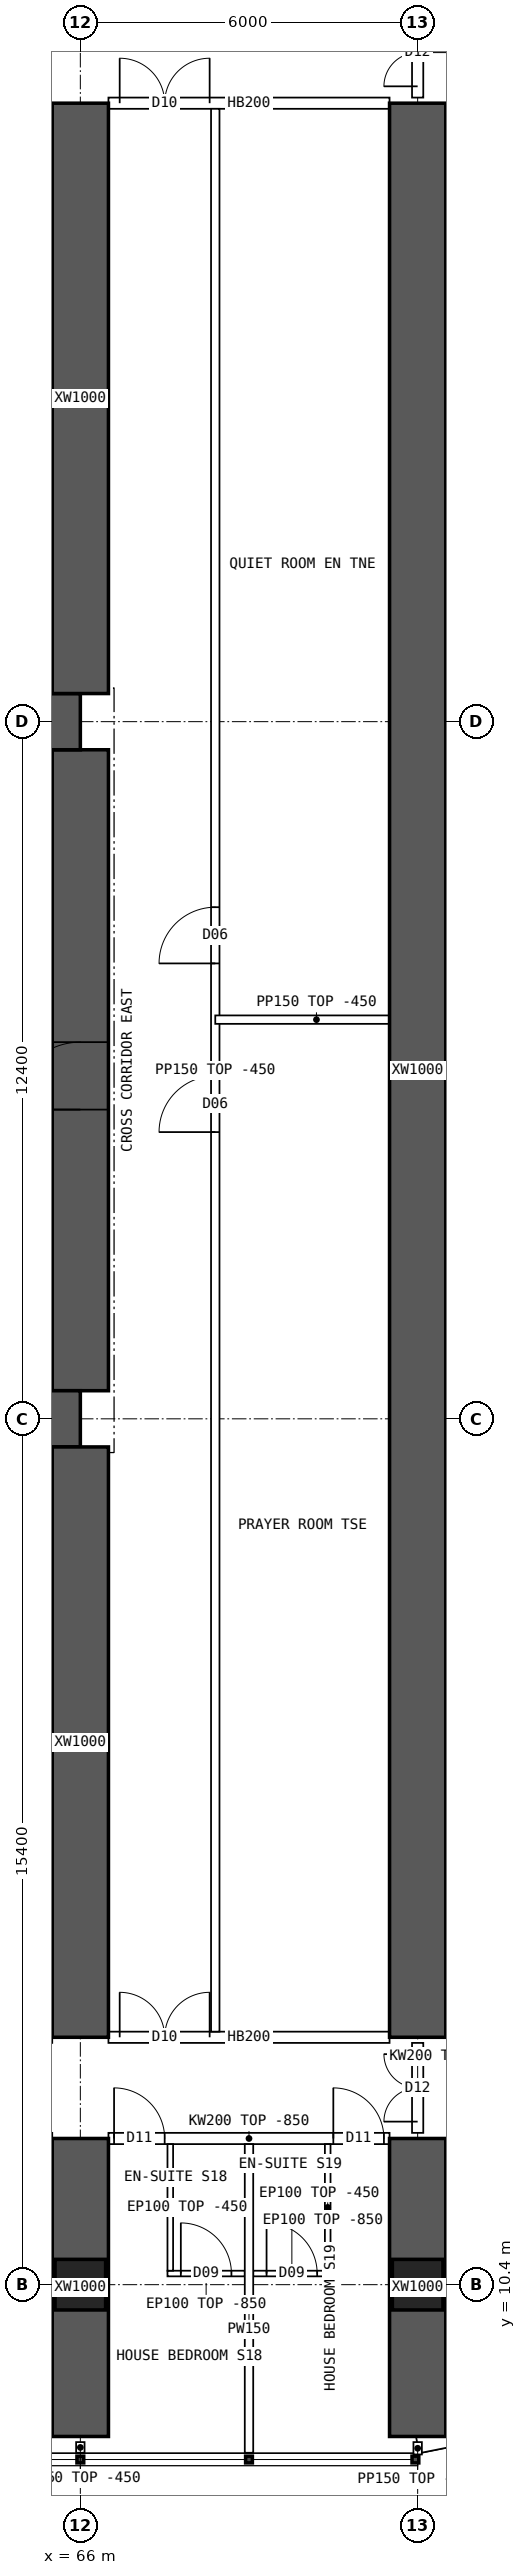
"""IFC4 building model, lengths in metres.
Left out: names, types, materials, properties, quantities, classifications, styles, units other than length and angle.
Written with IfcOpenShell. Run it as: python <this file> out.ifc"""

import sys

from ifc_helpers import new_model, si_unit, direction, frame, frame_2d, origin, origin_2d, place, context, subcontext, project, spatial, polyline, rectangle, hollow_rectangle, outline, extrude, element, fill, save


model = new_model("IFC4")
c1 = context("Model", 3, precision=1e-05, world=origin(), true_north=direction((0.0, 1.0)))
c2 = subcontext(c1, "Body", "Model", "MODEL_VIEW")
j1 = project(units=[si_unit("LENGTHUNIT", "METRE"), si_unit("PLANEANGLEUNIT", "RADIAN")], contexts=[c1])
p1 = place(None, origin())
s1 = spatial("IfcSite", under=j1, at=p1, CompositionType="ELEMENT")
p2 = place(p1, origin())
s2 = spatial("IfcBuilding", under=s1, at=p2, CompositionType="ELEMENT")
p3 = place(p2, frame((0.0, 0.0, 35.2)))
s3 = spatial("IfcBuildingStorey", under=s2, at=p3, CompositionType="ELEMENT", Elevation=35.2)
for number, where, z_axis, x_axis in (
    (1, (66.0, 10.4, 0.0), (0.0, 0.0, 1.0), (1.0, 0.0, 0.0)),
    (2, (72.0, 10.4, 0.0), (0.0, 0.0, 1.0), (1.0, 0.0, 0.0)),
):
    element("IfcColumn", number, at=place(p3, frame(where, z_axis=z_axis, x_axis=x_axis)), inside=s3, PredefinedType="COLUMN", context=c2, shape_type="SweptSolid", body=[
        extrude(hollow_rectangle(XDim=0.9, YDim=0.9, WallThickness=0.09, at=origin_2d()), origin(), (0.0, 0.0, 1.0), 3.75),
    ])
for number, where, z_axis, x_axis in (
    (3, (18.0, 25.8, 0.0), (0.0, 0.0, 1.0), (1.0, 0.0, 0.0)),
    (4, (18.0, 38.2, 0.0), (0.0, 0.0, 1.0), (1.0, 0.0, 0.0)),
):
    element("IfcWall", number, at=place(p3, frame(where, z_axis=z_axis, x_axis=x_axis)), inside=s3, PredefinedType="SHEAR", context=c2, shape_type="SweptSolid", body=[
        extrude(rectangle(XDim=48.0, YDim=1.0, at=frame_2d((24.0, 0.0))), origin(), (0.0, 0.0, 1.0), 3.75),
    ])
p4 = place(p3, frame((66.0, 26.3, 0.0), z_axis=(0.0, 0.0, 1.0), x_axis=(0.0, 1.0, 0.0)))
e5 = element("IfcWall", 5, at=p4, inside=s3, PredefinedType="SHEAR", context=c2, shape_type="SweptSolid", body=[
    extrude(rectangle(XDim=11.4, YDim=1.0, at=frame_2d((5.7, 0.0))), origin(), (0.0, 0.0, 1.0), 3.75),
])
p5 = place(p4, frame((5.0, 0.0, 0.0)))
e6 = element("IfcOpeningElement", 6, at=p5, cuts=e5, PredefinedType="OPENING", context=c2, shape_type="SweptSolid", body=[
    extrude(rectangle(XDim=1.2, YDim=2.1, at=frame_2d((0.6, 1.05))), frame((0.0, 0.51, 0.0), z_axis=(0.0, -1.0, 0.0), x_axis=(1.0, 0.0, 0.0)), (0.0, 0.0, 1.0), 1.02),
])
p6 = place(p3, frame((66.0, 7.7, 0.0), z_axis=(0.0, 0.0, 1.0), x_axis=(0.0, 1.0, 0.0)))
e7 = element("IfcWall", 7, at=p6, inside=s3, PredefinedType="SHEAR", context=c2, shape_type="SweptSolid", body=[
    extrude(rectangle(XDim=5.3, YDim=1.0, at=frame_2d((2.65, 0.0))), origin(), (0.0, 0.0, 1.0), 3.75),
])
for number, where, z_axis, x_axis in (
    (8, (66.0, 14.8, 0.0), (0.0, 0.0, 1.0), (0.0, 1.0, 0.0)),
    (9, (66.0, 38.7, 0.0), (0.0, 0.0, 1.0), (0.0, 1.0, 0.0)),
):
    element("IfcWall", number, at=place(p3, frame(where, z_axis=z_axis, x_axis=x_axis)), inside=s3, PredefinedType="SHEAR", context=c2, shape_type="SweptSolid", body=[
        extrude(rectangle(XDim=10.5, YDim=1.0, at=frame_2d((5.25, 0.0))), origin(), (0.0, 0.0, 1.0), 3.75),
    ])
p7 = place(p3, frame((72.0, 7.7, 0.0), z_axis=(0.0, 0.0, 1.0), x_axis=(0.0, 1.0, 0.0)))
e10 = element("IfcWall", 10, at=p7, inside=s3, PredefinedType="SHEAR", context=c2, shape_type="SweptSolid", body=[
    extrude(rectangle(XDim=5.3, YDim=1.0, at=frame_2d((2.65, 0.0))), origin(), (0.0, 0.0, 1.0), 3.75),
])
p8 = place(p3, frame((72.0, 14.8, 0.0), z_axis=(0.0, 0.0, 1.0), x_axis=(0.0, 1.0, 0.0)))
e11 = element("IfcWall", 11, at=p8, inside=s3, PredefinedType="SHEAR", context=c2, shape_type="SweptSolid", body=[
    extrude(rectangle(XDim=34.4, YDim=1.0, at=frame_2d((17.2, 0.0))), origin(), (0.0, 0.0, 1.0), 3.75),
])
p9 = place(p3, frame((72.0, 7.55, 0.0), z_axis=(0.0, 0.0, 1.0), x_axis=(0.980787251524, 0.195080412259, 0.0)))
e12 = element("IfcWall", 12, at=p9, inside=s3, PredefinedType="SOLIDWALL", context=c2, shape_type="SweptSolid", body=[
    extrude(outline(polyline([(-0.03, -0.15), (3.249, -0.15), (3.189, 0.15), (0.03, 0.15), (-0.03, -0.15)])), origin(), (0.0, 0.0, 1.0), 3.3),
])
p10 = place(p9, frame((0.909, 0.0, 0.9)))
e13 = element("IfcOpeningElement", 13, at=p10, cuts=e12, PredefinedType="OPENING", context=c2, shape_type="SweptSolid", body=[
    extrude(rectangle(XDim=1.4, YDim=1.8, at=frame_2d((0.7, 0.9))), frame((0.0, 0.16, 0.0), z_axis=(0.0, -1.0, 0.0), x_axis=(1.0, 0.0, 0.0)), (0.0, 0.0, 1.0), 0.32),
])
p11 = place(p3, frame((66.5, 13.0, 0.0), z_axis=(0.0, 0.0, 1.0), x_axis=(1.0, 0.0, 0.0)))
e14 = element("IfcWall", 14, at=p11, inside=s3, PredefinedType="SOLIDWALL", context=c2, shape_type="SweptSolid", body=[
    extrude(outline(polyline([(0.0, 0.0), (5.0, 0.0), (5.0, 2.9), (0.0, 2.9), (0.0, 0.0)])), frame((0.0, 0.1, 0.0), z_axis=(0.0, -1.0, 0.0), x_axis=(1.0, 0.0, 0.0)), (0.0, 0.0, 1.0), 0.2),
])
p12 = place(p11, frame((0.1, 0.0, 0.0)))
e15 = element("IfcOpeningElement", 15, at=p12, cuts=e14, PredefinedType="OPENING", context=c2, shape_type="SweptSolid", body=[
    extrude(rectangle(XDim=0.9, YDim=2.1, at=frame_2d((0.45, 1.05))), frame((0.0, 0.11, 0.0), z_axis=(0.0, -1.0, 0.0), x_axis=(1.0, 0.0, 0.0)), (0.0, 0.0, 1.0), 0.22),
])
p13 = place(p11, frame((4.0, 0.0, 0.0)))
e16 = element("IfcOpeningElement", 16, at=p13, cuts=e14, PredefinedType="OPENING", context=c2, shape_type="SweptSolid", body=[
    extrude(rectangle(XDim=0.9, YDim=2.1, at=frame_2d((0.45, 1.05))), frame((0.0, 0.11, 0.0), z_axis=(0.0, -1.0, 0.0), x_axis=(1.0, 0.0, 0.0)), (0.0, 0.0, 1.0), 0.22),
])
p14 = place(p3, frame((66.5, 14.8, 0.0), z_axis=(0.0, 0.0, 1.0), x_axis=(1.0, 0.0, 0.0)))
e17 = element("IfcWall", 17, at=p14, inside=s3, PredefinedType="SOLIDWALL", context=c2, shape_type="SweptSolid", body=[
    extrude(rectangle(XDim=5.0, YDim=0.2, at=frame_2d((2.5, 0.0))), origin(), (0.0, 0.0, 1.0), 3.3),
])
p15 = place(p14, frame((0.2, 0.0, 0.0)))
e18 = element("IfcOpeningElement", 18, at=p15, cuts=e17, PredefinedType="OPENING", context=c2, shape_type="SweptSolid", body=[
    extrude(rectangle(XDim=1.6, YDim=2.1, at=frame_2d((0.8, 1.05))), frame((0.0, 0.11, 0.0), z_axis=(0.0, -1.0, 0.0), x_axis=(1.0, 0.0, 0.0)), (0.0, 0.0, 1.0), 0.22),
])
p16 = place(p3, frame((66.5, 49.2, 0.0), z_axis=(0.0, 0.0, 1.0), x_axis=(1.0, 0.0, 0.0)))
e19 = element("IfcWall", 19, at=p16, inside=s3, PredefinedType="SOLIDWALL", context=c2, shape_type="SweptSolid", body=[
    extrude(rectangle(XDim=5.0, YDim=0.2, at=frame_2d((2.5, 0.0))), origin(), (0.0, 0.0, 1.0), 3.3),
])
p17 = place(p16, frame((0.2, 0.0, 0.0)))
e20 = element("IfcOpeningElement", 20, at=p17, cuts=e19, PredefinedType="OPENING", context=c2, shape_type="SweptSolid", body=[
    extrude(rectangle(XDim=1.6, YDim=2.1, at=frame_2d((0.8, 1.05))), frame((0.0, 0.11, 0.0), z_axis=(0.0, -1.0, 0.0), x_axis=(1.0, 0.0, 0.0)), (0.0, 0.0, 1.0), 0.22),
])
p18 = place(p3, frame((69.0, 7.41, 0.0), z_axis=(0.0, 0.0, 1.0), x_axis=(0.0, 1.0, 0.0)))
e21 = element("IfcWall", 21, at=p18, inside=s3, PredefinedType="PARTITIONING", context=c2, shape_type="SweptSolid", body=[
    extrude(outline(polyline([(0.0, 0.0), (5.49, 0.0), (5.49, 2.9), (5.442, 2.9), (5.44, 3.3), (3.192, 3.3), (3.19, 2.9), (2.792, 2.9), (2.79, 3.3), (0.0, 3.3), (0.0, 0.0)])), frame((0.0, 0.075, 0.0), z_axis=(0.0, -1.0, 0.0), x_axis=(1.0, 0.0, 0.0)), (0.0, 0.0, 1.0), 0.15),
])
p19 = place(p3, frame((68.925, 10.598, 0.0), z_axis=(0.0, 0.0, 1.0), x_axis=(-1.0, 0.0, 0.0)))
e22 = element("IfcWall", 22, at=p19, inside=s3, PredefinedType="PARTITIONING", context=c2, shape_type="SweptSolid", body=[
    extrude(outline(polyline([(0.0, 0.0), (1.375, 0.0), (1.375, 2.9), (0.0, 2.9), (0.0, 0.0)])), frame((0.0, 0.05, 0.0), z_axis=(0.0, -1.0, 0.0), x_axis=(1.0, 0.0, 0.0)), (0.0, 0.0, 1.0), 0.1),
])
p20 = place(p19, frame((0.238, 0.0, 0.0)))
e23 = element("IfcOpeningElement", 23, at=p20, cuts=e22, PredefinedType="OPENING", context=c2, shape_type="SweptSolid", body=[
    extrude(rectangle(XDim=0.9, YDim=2.1, at=frame_2d((0.45, 1.05))), frame((0.0, 0.06, 0.0), z_axis=(0.0, -1.0, 0.0), x_axis=(1.0, 0.0, 0.0)), (0.0, 0.0, 1.0), 0.12),
])
p21 = place(p3, frame((67.6, 10.648, 0.0), z_axis=(0.0, 0.0, 1.0), x_axis=(0.0, 1.0, 0.0)))
e24 = element("IfcWall", 24, at=p21, inside=s3, PredefinedType="PARTITIONING", context=c2, shape_type="SweptSolid", body=[
    extrude(outline(polyline([(0.0, 0.0), (2.252, 0.0), (2.252, 2.9), (2.204, 2.9), (2.202, 3.3), (0.0, 3.3), (0.0, 0.0)])), frame((0.0, 0.05, 0.0), z_axis=(0.0, -1.0, 0.0), x_axis=(1.0, 0.0, 0.0)), (0.0, 0.0, 1.0), 0.1),
])
p22 = place(p3, frame((70.45, 10.598, 0.0), z_axis=(0.0, 0.0, 1.0), x_axis=(-1.0, 0.0, 0.0)))
e25 = element("IfcWall", 25, at=p22, inside=s3, PredefinedType="PARTITIONING", context=c2, shape_type="SweptSolid", body=[
    extrude(outline(polyline([(0.0, 0.0), (1.375, 0.0), (1.375, 2.9), (0.0, 2.9), (0.0, 0.0)])), frame((0.0, 0.05, 0.0), z_axis=(0.0, -1.0, 0.0), x_axis=(1.0, 0.0, 0.0)), (0.0, 0.0, 1.0), 0.1),
])
p23 = place(p22, frame((0.238, 0.0, 0.0)))
e26 = element("IfcOpeningElement", 26, at=p23, cuts=e25, PredefinedType="OPENING", context=c2, shape_type="SweptSolid", body=[
    extrude(rectangle(XDim=0.9, YDim=2.1, at=frame_2d((0.45, 1.05))), frame((0.0, 0.06, 0.0), z_axis=(0.0, -1.0, 0.0), x_axis=(1.0, 0.0, 0.0)), (0.0, 0.0, 1.0), 0.12),
])
p24 = place(p3, frame((70.4, 10.648, 0.0), z_axis=(0.0, 0.0, 1.0), x_axis=(0.0, 1.0, 0.0)))
e27 = element("IfcWall", 27, at=p24, inside=s3, PredefinedType="PARTITIONING", context=c2, shape_type="SweptSolid", body=[
    extrude(outline(polyline([(0.0, 0.0), (2.252, 0.0), (2.252, 2.9), (2.204, 2.9), (2.202, 3.3), (0.0, 3.3), (0.0, 0.0)])), frame((0.0, 0.05, 0.0), z_axis=(0.0, -1.0, 0.0), x_axis=(1.0, 0.0, 0.0)), (0.0, 0.0, 1.0), 0.1),
])
p25 = place(p3, frame((68.4, 14.9, 0.0), z_axis=(0.0, 0.0, 1.0), x_axis=(0.0, 1.0, 0.0)))
e28 = element("IfcWall", 28, at=p25, inside=s3, PredefinedType="PARTITIONING", context=c2, shape_type="SweptSolid", body=[
    extrude(rectangle(XDim=34.2, YDim=0.15, at=frame_2d((17.1, 0.0))), origin(), (0.0, 0.0, 1.0), 3.3),
])
p26 = place(p25, frame((16.0, 0.0, 0.0)))
e29 = element("IfcOpeningElement", 29, at=p26, cuts=e28, PredefinedType="OPENING", context=c2, shape_type="SweptSolid", body=[
    extrude(rectangle(XDim=1.0, YDim=2.1, at=frame_2d((0.5, 1.05))), frame((0.0, 0.085, 0.0), z_axis=(0.0, -1.0, 0.0), x_axis=(1.0, 0.0, 0.0)), (0.0, 0.0, 1.0), 0.17),
])
p27 = place(p25, frame((19.0, 0.0, 0.0)))
e30 = element("IfcOpeningElement", 30, at=p27, cuts=e28, PredefinedType="OPENING", context=c2, shape_type="SweptSolid", body=[
    extrude(rectangle(XDim=1.0, YDim=2.1, at=frame_2d((0.5, 1.05))), frame((0.0, 0.085, 0.0), z_axis=(0.0, -1.0, 0.0), x_axis=(1.0, 0.0, 0.0)), (0.0, 0.0, 1.0), 0.17),
])
p28 = place(p3, frame((68.4, 32.9, 0.0), z_axis=(0.0, 0.0, 1.0), x_axis=(1.0, 0.0, 0.0)))
e31 = element("IfcWall", 31, at=p28, inside=s3, PredefinedType="PARTITIONING", context=c2, shape_type="SweptSolid", body=[
    extrude(rectangle(XDim=3.6, YDim=0.15, at=frame_2d((1.8, 0.0))), origin(), (0.0, 0.0, 1.0), 3.3),
])
p29 = place(p3, frame((72.075, 30.85, 0.0), z_axis=(0.0, 0.0, 1.0), x_axis=(1.0, 0.0, 0.0)))
e32 = element("IfcWall", 32, at=p29, inside=s3, PredefinedType="PARTITIONING", context=c2, shape_type="SweptSolid", body=[
    extrude(outline(polyline([(0.0, 0.0), (8.02, 0.0), (8.02, 3.3), (6.227, 3.3), (6.225, 2.85), (5.627, 2.85), (5.625, 3.3), (0.0, 3.3), (0.0, 0.0)])), frame((0.0, 0.075, 0.0), z_axis=(0.0, -1.0, 0.0), x_axis=(1.0, 0.0, 0.0)), (0.0, 0.0, 1.0), 0.15),
])
p30 = place(p3, frame((72.0, 13.1, 0.0), z_axis=(0.0, 0.0, 1.0), x_axis=(0.0, 1.0, 0.0)))
e33 = element("IfcWall", 33, at=p30, inside=s3, PredefinedType="SOLIDWALL", context=c2, shape_type="SweptSolid", body=[
    extrude(outline(polyline([(0.0, 0.0), (1.6, 0.0), (1.6, 2.85), (0.0, 2.85), (0.0, 0.0)])), frame((0.0, 0.1, 0.0), z_axis=(0.0, -1.0, 0.0), x_axis=(1.0, 0.0, 0.0)), (0.0, 0.0, 1.0), 0.2),
])
p31 = place(p30, frame((0.2, 0.0, 0.0)))
e34 = element("IfcOpeningElement", 34, at=p31, cuts=e33, PredefinedType="OPENING", context=c2, shape_type="SweptSolid", body=[
    extrude(rectangle(XDim=1.2, YDim=2.1, at=frame_2d((0.6, 1.05))), frame((0.0, 0.11, 0.0), z_axis=(0.0, -1.0, 0.0), x_axis=(1.0, 0.0, 0.0)), (0.0, 0.0, 1.0), 0.22),
])
p32 = place(p3, frame((72.0, 49.3, 0.0), z_axis=(0.0, 0.0, 1.0), x_axis=(0.0, 1.0, 0.0)))
e35 = element("IfcWall", 35, at=p32, inside=s3, PredefinedType="SOLIDWALL", context=c2, shape_type="SweptSolid", body=[
    extrude(outline(polyline([(0.0, 0.0), (1.6, 0.0), (1.6, 2.85), (0.0, 2.85), (0.0, 0.0)])), frame((0.0, 0.1, 0.0), z_axis=(0.0, -1.0, 0.0), x_axis=(1.0, 0.0, 0.0)), (0.0, 0.0, 1.0), 0.2),
])
p33 = place(p32, frame((0.2, 0.0, 0.0)))
e36 = element("IfcOpeningElement", 36, at=p33, cuts=e35, PredefinedType="OPENING", context=c2, shape_type="SweptSolid", body=[
    extrude(rectangle(XDim=1.2, YDim=2.1, at=frame_2d((0.6, 1.05))), frame((0.0, 0.11, 0.0), z_axis=(0.0, -1.0, 0.0), x_axis=(1.0, 0.0, 0.0)), (0.0, 0.0, 1.0), 0.22),
])
p34 = place(p3, frame((66.0, 7.6, 0.0), z_axis=(0.0, 0.0, 1.0), x_axis=(0.0, -1.0, 0.0)))
e37 = element("IfcWall", 37, at=p34, inside=s3, PredefinedType="PARTITIONING", context=c2, shape_type="SweptSolid", body=[
    extrude(rectangle(XDim=0.19, YDim=0.15, at=frame_2d((0.095, 0.0))), origin(), (0.0, 0.0, 1.0), 3.3),
])
p35 = place(p3, frame((72.0, 7.6, 0.0), z_axis=(0.0, 0.0, 1.0), x_axis=(0.0, -1.0, 0.0)))
e38 = element("IfcWall", 38, at=p35, inside=s3, PredefinedType="PARTITIONING", context=c2, shape_type="SweptSolid", body=[
    extrude(rectangle(XDim=0.22, YDim=0.15, at=frame_2d((0.11, 0.0))), origin(), (0.0, 0.0, 1.0), 3.3),
])
p36 = place(p5, origin())
e39 = element("IfcDoor", 39, at=p36, inside=s3, OperationType="SINGLE_SWING_LEFT", PredefinedType="DOOR", context=c2, shape_type="SweptSolid", body=[
    extrude(rectangle(XDim=1.2, YDim=2.1, at=frame_2d((0.6, 1.05))), frame((0.0, 0.025, 0.0), z_axis=(0.0, -1.0, 0.0), x_axis=(1.0, 0.0, 0.0)), (0.0, 0.0, 1.0), 0.05),
])
fill(e6, e39)
p37 = place(p15, origin())
e40 = element("IfcDoor", 40, at=p37, inside=s3, OperationType="DOUBLE_DOOR_SINGLE_SWING", PredefinedType="DOOR", context=c2, shape_type="SweptSolid", body=[
    extrude(rectangle(XDim=1.6, YDim=2.1, at=frame_2d((0.8, 1.05))), frame((0.0, 0.025, 0.0), z_axis=(0.0, -1.0, 0.0), x_axis=(1.0, 0.0, 0.0)), (0.0, 0.0, 1.0), 0.05),
])
fill(e18, e40)
p38 = place(p17, origin())
e41 = element("IfcDoor", 41, at=p38, inside=s3, OperationType="DOUBLE_DOOR_SINGLE_SWING", PredefinedType="DOOR", context=c2, shape_type="SweptSolid", body=[
    extrude(rectangle(XDim=1.6, YDim=2.1, at=frame_2d((0.8, 1.05))), frame((0.0, 0.025, 0.0), z_axis=(0.0, -1.0, 0.0), x_axis=(1.0, 0.0, 0.0)), (0.0, 0.0, 1.0), 0.05),
])
fill(e20, e41)
p39 = place(p20, origin())
e42 = element("IfcDoor", 42, at=p39, inside=s3, OperationType="SINGLE_SWING_RIGHT", PredefinedType="DOOR", context=c2, shape_type="SweptSolid", body=[
    extrude(rectangle(XDim=0.9, YDim=2.1, at=frame_2d((0.45, 1.05))), frame((0.0, 0.025, 0.0), z_axis=(0.0, -1.0, 0.0), x_axis=(1.0, 0.0, 0.0)), (0.0, 0.0, 1.0), 0.05),
])
fill(e23, e42)
p40 = place(p12, origin())
e43 = element("IfcDoor", 43, at=p40, inside=s3, OperationType="SINGLE_SWING_LEFT", PredefinedType="DOOR", context=c2, shape_type="SweptSolid", body=[
    extrude(rectangle(XDim=0.9, YDim=2.1, at=frame_2d((0.45, 1.05))), frame((0.0, 0.025, 0.0), z_axis=(0.0, -1.0, 0.0), x_axis=(1.0, 0.0, 0.0)), (0.0, 0.0, 1.0), 0.05),
])
fill(e15, e43)
p41 = place(p23, origin())
e44 = element("IfcDoor", 44, at=p41, inside=s3, OperationType="SINGLE_SWING_RIGHT", PredefinedType="DOOR", context=c2, shape_type="SweptSolid", body=[
    extrude(rectangle(XDim=0.9, YDim=2.1, at=frame_2d((0.45, 1.05))), frame((0.0, 0.025, 0.0), z_axis=(0.0, -1.0, 0.0), x_axis=(1.0, 0.0, 0.0)), (0.0, 0.0, 1.0), 0.05),
])
fill(e26, e44)
p42 = place(p13, origin())
e45 = element("IfcDoor", 45, at=p42, inside=s3, OperationType="SINGLE_SWING_LEFT", PredefinedType="DOOR", context=c2, shape_type="SweptSolid", body=[
    extrude(rectangle(XDim=0.9, YDim=2.1, at=frame_2d((0.45, 1.05))), frame((0.0, 0.025, 0.0), z_axis=(0.0, -1.0, 0.0), x_axis=(1.0, 0.0, 0.0)), (0.0, 0.0, 1.0), 0.05),
])
fill(e16, e45)
p43 = place(p26, origin())
e46 = element("IfcDoor", 46, at=p43, inside=s3, OperationType="SINGLE_SWING_LEFT", PredefinedType="DOOR", context=c2, shape_type="SweptSolid", body=[
    extrude(rectangle(XDim=1.0, YDim=2.1, at=frame_2d((0.5, 1.05))), frame((0.0, 0.025, 0.0), z_axis=(0.0, -1.0, 0.0), x_axis=(1.0, 0.0, 0.0)), (0.0, 0.0, 1.0), 0.05),
])
fill(e29, e46)
p44 = place(p27, origin())
e47 = element("IfcDoor", 47, at=p44, inside=s3, OperationType="SINGLE_SWING_LEFT", PredefinedType="DOOR", context=c2, shape_type="SweptSolid", body=[
    extrude(rectangle(XDim=1.0, YDim=2.1, at=frame_2d((0.5, 1.05))), frame((0.0, 0.025, 0.0), z_axis=(0.0, -1.0, 0.0), x_axis=(1.0, 0.0, 0.0)), (0.0, 0.0, 1.0), 0.05),
])
fill(e30, e47)
p45 = place(p31, origin())
e48 = element("IfcDoor", 48, at=p45, inside=s3, OperationType="DOUBLE_DOOR_SINGLE_SWING", PredefinedType="DOOR", context=c2, shape_type="SweptSolid", body=[
    extrude(rectangle(XDim=1.2, YDim=2.1, at=frame_2d((0.6, 1.05))), frame((0.0, 0.025, 0.0), z_axis=(0.0, -1.0, 0.0), x_axis=(1.0, 0.0, 0.0)), (0.0, 0.0, 1.0), 0.05),
])
fill(e34, e48)
p46 = place(p33, origin())
e49 = element("IfcDoor", 49, at=p46, inside=s3, OperationType="DOUBLE_DOOR_SINGLE_SWING", PredefinedType="DOOR", context=c2, shape_type="SweptSolid", body=[
    extrude(rectangle(XDim=1.2, YDim=2.1, at=frame_2d((0.6, 1.05))), frame((0.0, 0.025, 0.0), z_axis=(0.0, -1.0, 0.0), x_axis=(1.0, 0.0, 0.0)), (0.0, 0.0, 1.0), 0.05),
])
fill(e36, e49)
save(model, sys.argv[1])
